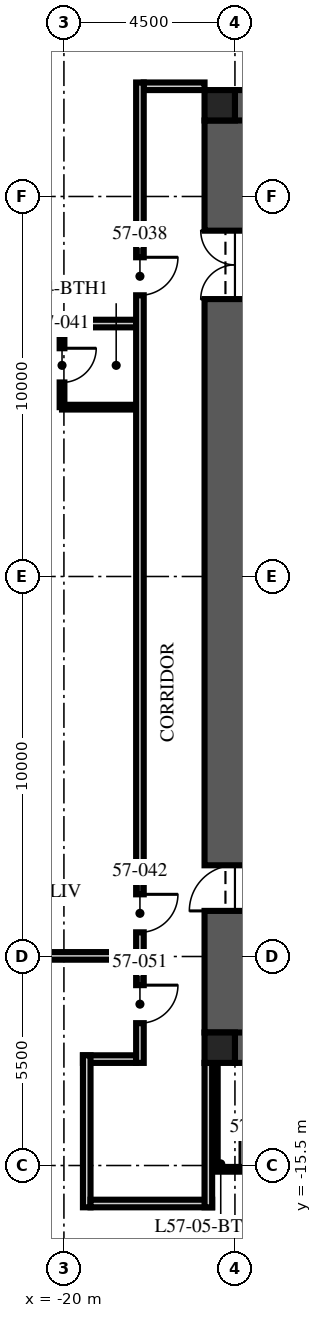
"""IFC4 building model, lengths in metres.
Left out: names, types, materials, properties, quantities, classifications, styles, units other than length and angle.
Written with IfcOpenShell. Run it as: python <this file> out.ifc"""

import sys

from ifc_helpers import new_model, si_unit, direction, frame, frame_2d, origin, origin_2d, place, context, subcontext, project, spatial, rectangle, extrude, element, fill, save


model = new_model("IFC4")
c1 = context("Model", 3, precision=1e-05, world=origin(), true_north=direction((0.0, 1.0)))
c2 = subcontext(c1, "Body", "Model", "MODEL_VIEW")
j1 = project(units=[si_unit("LENGTHUNIT", "METRE"), si_unit("PLANEANGLEUNIT", "RADIAN")], contexts=[c1])
p1 = place(None, origin())
s1 = spatial("IfcSite", under=j1, at=p1, CompositionType="ELEMENT")
p2 = place(p1, origin())
s2 = spatial("IfcBuilding", under=s1, at=p2, CompositionType="ELEMENT")
p3 = place(p2, frame((0.0, 0.0, 229.5)))
s3 = spatial("IfcBuildingStorey", under=s2, at=p3, CompositionType="ELEMENT", Elevation=229.5)
for number, where, z_axis, x_axis in (
    (1, (-15.5, 12.0, -0.25), (0.0, 0.0, 1.0), (1.0, 0.0, 0.0)),
    (2, (-15.5, -12.0, -0.25), (0.0, 0.0, 1.0), (1.0, 0.0, 0.0)),
):
    element("IfcWall", number, at=place(p3, frame(where, z_axis=z_axis, x_axis=x_axis)), inside=s3, PredefinedType="SHEAR", context=c2, shape_type="SweptSolid", body=[
        extrude(rectangle(XDim=31.0, YDim=1.6, at=frame_2d((15.5, 0.0))), origin(), (0.0, 0.0, 1.0), 3.75),
    ])
p4 = place(p3, frame((-15.5, -12.0, -0.25), z_axis=(0.0, 0.0, 1.0), x_axis=(0.0, 1.0, 0.0)))
e3 = element("IfcWall", 3, at=p4, inside=s3, PredefinedType="SHEAR", context=c2, shape_type="SweptSolid", body=[
    extrude(rectangle(XDim=24.0, YDim=1.6, at=frame_2d((12.0, 0.0))), origin(), (0.0, 0.0, 1.0), 3.75),
])
p5 = place(p4, frame((3.2, 0.0, 0.25)))
e4 = element("IfcOpeningElement", 4, at=p5, cuts=e3, PredefinedType="OPENING", context=c2, shape_type="SweptSolid", body=[
    extrude(rectangle(XDim=1.2, YDim=2.1, at=frame_2d((0.6, 1.05))), frame((0.0, 0.81, 0.0), z_axis=(0.0, -1.0, 0.0), x_axis=(1.0, 0.0, 0.0)), (0.0, 0.0, 1.0), 1.62),
])
p6 = place(p4, frame((19.3, 0.0, 0.25)))
e5 = element("IfcOpeningElement", 5, at=p6, cuts=e3, PredefinedType="OPENING", context=c2, shape_type="SweptSolid", body=[
    extrude(rectangle(XDim=1.8, YDim=2.1, at=frame_2d((0.9, 1.05))), frame((0.0, 0.81, 0.0), z_axis=(0.0, -1.0, 0.0), x_axis=(1.0, 0.0, 0.0)), (0.0, 0.0, 1.0), 1.62),
])
for number, where, z_axis, x_axis in (
    (6, (-15.9, 12.4, -0.25), (0.0, 0.0, 1.0), (1.0, 0.0, 0.0)),
    (7, (-15.9, -12.4, -0.25), (0.0, 0.0, 1.0), (1.0, 0.0, 0.0)),
):
    element("IfcColumn", number, at=place(p3, frame(where, z_axis=z_axis, x_axis=x_axis)), inside=s3, PredefinedType="COLUMN", context=c2, shape_type="SweptSolid", body=[
        extrude(rectangle(XDim=0.8, YDim=0.8, at=origin_2d()), origin(), (0.0, 0.0, 1.0), 3.75),
    ])
p7 = place(p3, frame((-18.1, -12.7, 0.0), z_axis=(0.0, 0.0, 1.0), x_axis=(-1.0, 0.0, 0.0)))
e8 = element("IfcWall", 8, at=p7, inside=s3, PredefinedType="PARTITIONING", context=c2, shape_type="SweptSolid", body=[
    extrude(rectangle(XDim=1.4, YDim=0.2, at=frame_2d((0.7, 0.0))), origin(), (0.0, 0.0, 1.0), 2.81),
])
p8 = place(p3, frame((-19.4, -12.6, 0.0), z_axis=(0.0, 0.0, 1.0), x_axis=(0.0, -1.0, 0.0)))
e9 = element("IfcWall", 9, at=p8, inside=s3, PredefinedType="PARTITIONING", context=c2, shape_type="SweptSolid", body=[
    extrude(rectangle(XDim=4.0, YDim=0.2, at=frame_2d((2.0, 0.0))), origin(), (0.0, 0.0, 1.0), 2.6),
])
p9 = place(p3, frame((-19.3, -16.5, 0.0), z_axis=(0.0, 0.0, 1.0), x_axis=(1.0, 0.0, 0.0)))
e10 = element("IfcWall", 10, at=p9, inside=s3, PredefinedType="PARTITIONING", context=c2, shape_type="SweptSolid", body=[
    extrude(rectangle(XDim=3.2, YDim=0.2, at=frame_2d((1.6, 0.0))), origin(), (0.0, 0.0, 1.0), 2.3),
])
p10 = place(p3, frame((-16.2, -16.6, 0.0), z_axis=(0.0, 0.0, 1.0), x_axis=(0.0, 1.0, 0.0)))
e11 = element("IfcWall", 11, at=p10, inside=s3, PredefinedType="PARTITIONING", context=c2, shape_type="SweptSolid", body=[
    extrude(rectangle(XDim=3.8, YDim=0.2, at=frame_2d((1.9, 0.0))), origin(), (0.0, 0.0, 1.0), 2.3),
])
p11 = place(p3, frame((-16.3, 12.9, 0.0), z_axis=(0.0, 0.0, 1.0), x_axis=(-1.0, 0.0, 0.0)))
e12 = element("IfcWall", 12, at=p11, inside=s3, PredefinedType="PARTITIONING", context=c2, shape_type="SweptSolid", body=[
    extrude(rectangle(XDim=1.6, YDim=0.2, at=frame_2d((0.8, 0.0))), origin(), (0.0, 0.0, 1.0), 2.3),
])
for number, where, z_axis, x_axis in (
    (13, (-18.1, 6.656, 0.0), (0.0, 0.0, 1.0), (-1.0, 0.0, 0.0)),
    (14, (-18.1, -9.984, 0.0), (0.0, 0.0, 1.0), (-1.0, 0.0, 0.0)),
):
    element("IfcWall", number, at=place(p3, frame(where, z_axis=z_axis, x_axis=x_axis)), inside=s3, PredefinedType="PARTITIONING", context=c2, shape_type="SweptSolid", body=[
        extrude(rectangle(XDim=7.85, YDim=0.2, at=frame_2d((3.925, 0.0))), origin(), (0.0, 0.0, 1.0), 2.91),
    ])
p12 = place(p3, frame((-20.05, 6.656, 0.0), z_axis=(0.0, 0.0, 1.0), x_axis=(0.0, -1.0, 0.0)))
e15 = element("IfcWall", 15, at=p12, inside=s3, PredefinedType="PARTITIONING", context=c2, shape_type="SweptSolid", body=[
    extrude(rectangle(XDim=2.2, YDim=0.125, at=frame_2d((1.1, 0.0))), origin(), (0.0, 0.0, 1.0), 3.5),
])
p13 = place(p12, frame((0.65, 0.0, 0.0)))
e16 = element("IfcOpeningElement", 16, at=p13, cuts=e15, PredefinedType="OPENING", context=c2, shape_type="SweptSolid", body=[
    extrude(rectangle(XDim=0.9, YDim=2.1, at=frame_2d((0.45, 1.05))), frame((0.0, 0.073, 0.0), z_axis=(0.0, -1.0, 0.0), x_axis=(1.0, 0.0, 0.0)), (0.0, 0.0, 1.0), 0.145),
])
p14 = place(p3, frame((-18.1, 4.456, 0.0), z_axis=(0.0, 0.0, 1.0), x_axis=(-1.0, 0.0, 0.0)))
e17 = element("IfcWall", 17, at=p14, inside=s3, PredefinedType="PARTITIONING", context=c2, shape_type="SweptSolid", body=[
    extrude(rectangle(XDim=1.95, YDim=0.125, at=frame_2d((0.975, 0.0))), origin(), (0.0, 0.0, 1.0), 3.5),
])
p15 = place(p3, frame((-16.017, -15.6, 0.0), z_axis=(0.0, 0.0, 1.0), x_axis=(1.0, 0.0, 0.0)))
e18 = element("IfcWall", 18, at=p15, inside=s3, PredefinedType="PARTITIONING", context=c2, shape_type="SweptSolid", body=[
    extrude(rectangle(XDim=4.0, YDim=0.125, at=frame_2d((2.0, 0.0))), origin(), (0.0, 0.0, 1.0), 2.81),
])
p16 = place(p15, frame((0.65, 0.0, 0.0)))
e19 = element("IfcOpeningElement", 19, at=p16, cuts=e18, PredefinedType="OPENING", context=c2, shape_type="SweptSolid", body=[
    extrude(rectangle(XDim=0.9, YDim=2.1, at=frame_2d((0.45, 1.05))), frame((0.0, 0.073, 0.0), z_axis=(0.0, -1.0, 0.0), x_axis=(1.0, 0.0, 0.0)), (0.0, 0.0, 1.0), 0.145),
])
p17 = place(p15, frame((2.65, 0.0, 0.0)))
e20 = element("IfcOpeningElement", 20, at=p17, cuts=e18, PredefinedType="OPENING", context=c2, shape_type="SweptSolid", body=[
    extrude(rectangle(XDim=0.9, YDim=2.1, at=frame_2d((0.45, 1.05))), frame((0.0, 0.073, 0.0), z_axis=(0.0, -1.0, 0.0), x_axis=(1.0, 0.0, 0.0)), (0.0, 0.0, 1.0), 0.145),
])
p18 = place(p3, frame((-16.017, -12.8, 0.0), z_axis=(0.0, 0.0, 1.0), x_axis=(0.0, -1.0, 0.0)))
e21 = element("IfcWall", 21, at=p18, inside=s3, PredefinedType="PARTITIONING", context=c2, shape_type="SweptSolid", body=[
    extrude(rectangle(XDim=2.8, YDim=0.125, at=frame_2d((1.4, 0.0))), origin(), (0.0, 0.0, 1.0), 2.3),
])
p19 = place(p3, frame((-18.0, 13.0, 0.0), z_axis=(0.0, 0.0, 1.0), x_axis=(0.0, -1.0, 0.0)))
e22 = element("IfcWall", 22, at=p19, inside=s3, PredefinedType="PARTITIONING", context=c2, shape_type="SweptSolid", body=[
    extrude(rectangle(XDim=25.8, YDim=0.2, at=frame_2d((12.9, 0.0))), origin(), (0.0, 0.0, 1.0), 2.6),
])
p20 = place(p19, frame((4.6, 0.0, 0.0)))
e23 = element("IfcOpeningElement", 23, at=p20, cuts=e22, PredefinedType="OPENING", context=c2, shape_type="SweptSolid", body=[
    extrude(rectangle(XDim=1.0, YDim=2.2, at=frame_2d((0.5, 1.1))), frame((0.0, 0.11, 0.0), z_axis=(0.0, -1.0, 0.0), x_axis=(1.0, 0.0, 0.0)), (0.0, 0.0, 1.0), 0.22),
])
p21 = place(p19, frame((21.364, 0.0, 0.0)))
e24 = element("IfcOpeningElement", 24, at=p21, cuts=e22, PredefinedType="OPENING", context=c2, shape_type="SweptSolid", body=[
    extrude(rectangle(XDim=1.0, YDim=2.2, at=frame_2d((0.5, 1.1))), frame((0.0, 0.11, 0.0), z_axis=(0.0, -1.0, 0.0), x_axis=(1.0, 0.0, 0.0)), (0.0, 0.0, 1.0), 0.22),
])
p22 = place(p19, frame((23.754, 0.0, 0.0)))
e25 = element("IfcOpeningElement", 25, at=p22, cuts=e22, PredefinedType="OPENING", context=c2, shape_type="SweptSolid", body=[
    extrude(rectangle(XDim=1.0, YDim=2.2, at=frame_2d((0.5, 1.1))), frame((0.0, 0.11, 0.0), z_axis=(0.0, -1.0, 0.0), x_axis=(1.0, 0.0, 0.0)), (0.0, 0.0, 1.0), 0.22),
])
p23 = place(p5, origin())
e26 = element("IfcDoor", 26, at=p23, inside=s3, OperationType="SINGLE_SWING_LEFT", PredefinedType="DOOR", context=c2, shape_type="SweptSolid", body=[
    extrude(rectangle(XDim=1.2, YDim=2.1, at=frame_2d((0.6, 1.05))), frame((0.0, 0.025, 0.0), z_axis=(0.0, -1.0, 0.0), x_axis=(1.0, 0.0, 0.0)), (0.0, 0.0, 1.0), 0.05),
])
fill(e4, e26)
p24 = place(p6, origin())
e27 = element("IfcDoor", 27, at=p24, inside=s3, OperationType="DOUBLE_DOOR_SINGLE_SWING", PredefinedType="DOOR", context=c2, shape_type="SweptSolid", body=[
    extrude(rectangle(XDim=1.8, YDim=2.1, at=frame_2d((0.9, 1.05))), frame((0.0, 0.025, 0.0), z_axis=(0.0, -1.0, 0.0), x_axis=(1.0, 0.0, 0.0)), (0.0, 0.0, 1.0), 0.05),
])
fill(e5, e27)
p25 = place(p20, origin())
e28 = element("IfcDoor", 28, at=p25, inside=s3, OperationType="SINGLE_SWING_LEFT", PredefinedType="DOOR", context=c2, shape_type="SweptSolid", body=[
    extrude(rectangle(XDim=1.0, YDim=2.2, at=frame_2d((0.5, 1.1))), frame((0.0, 0.025, 0.0), z_axis=(0.0, -1.0, 0.0), x_axis=(1.0, 0.0, 0.0)), (0.0, 0.0, 1.0), 0.05),
])
fill(e23, e28)
p26 = place(p13, origin())
e29 = element("IfcDoor", 29, at=p26, inside=s3, OperationType="SINGLE_SWING_LEFT", PredefinedType="DOOR", context=c2, shape_type="SweptSolid", body=[
    extrude(rectangle(XDim=0.9, YDim=2.1, at=frame_2d((0.45, 1.05))), frame((0.0, 0.025, 0.0), z_axis=(0.0, -1.0, 0.0), x_axis=(1.0, 0.0, 0.0)), (0.0, 0.0, 1.0), 0.05),
])
fill(e16, e29)
p27 = place(p21, origin())
e30 = element("IfcDoor", 30, at=p27, inside=s3, OperationType="SINGLE_SWING_LEFT", PredefinedType="DOOR", context=c2, shape_type="SweptSolid", body=[
    extrude(rectangle(XDim=1.0, YDim=2.2, at=frame_2d((0.5, 1.1))), frame((0.0, 0.025, 0.0), z_axis=(0.0, -1.0, 0.0), x_axis=(1.0, 0.0, 0.0)), (0.0, 0.0, 1.0), 0.05),
])
fill(e24, e30)
p28 = place(p16, origin())
e31 = element("IfcDoor", 31, at=p28, inside=s3, OperationType="SINGLE_SWING_LEFT", PredefinedType="DOOR", context=c2, shape_type="SweptSolid", body=[
    extrude(rectangle(XDim=0.9, YDim=2.1, at=frame_2d((0.45, 1.05))), frame((0.0, 0.025, 0.0), z_axis=(0.0, -1.0, 0.0), x_axis=(1.0, 0.0, 0.0)), (0.0, 0.0, 1.0), 0.05),
])
fill(e19, e31)
p29 = place(p22, origin())
e32 = element("IfcDoor", 32, at=p29, inside=s3, OperationType="SINGLE_SWING_LEFT", PredefinedType="DOOR", context=c2, shape_type="SweptSolid", body=[
    extrude(rectangle(XDim=1.0, YDim=2.2, at=frame_2d((0.5, 1.1))), frame((0.0, 0.025, 0.0), z_axis=(0.0, -1.0, 0.0), x_axis=(1.0, 0.0, 0.0)), (0.0, 0.0, 1.0), 0.05),
])
fill(e25, e32)
save(model, sys.argv[1])
